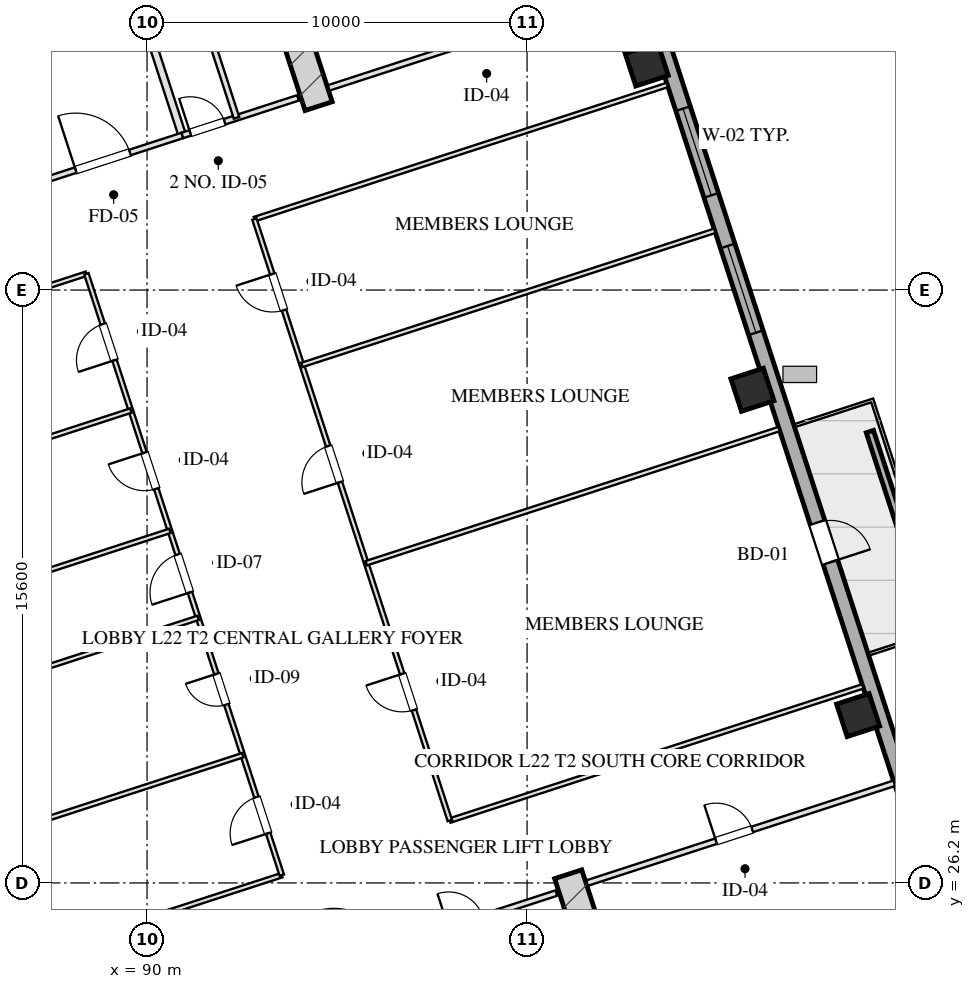
"""IFC4 building model, lengths in metres.
Left out: names, types, materials, properties, quantities, classifications, styles, units other than length and angle.
Written with IfcOpenShell. Run it as: python <this file> out.ifc"""

import sys

from ifc_helpers import new_model, si_unit, direction, frame, frame_2d, origin, origin_2d, place, context, subcontext, project, spatial, rectangle, hollow_rectangle, extrude, element, fill, save


model = new_model("IFC4")
c1 = context("Model", 3, precision=1e-05, world=origin(), true_north=direction((0.0, 1.0)))
c2 = subcontext(c1, "Body", "Model", "MODEL_VIEW")
j1 = project(units=[si_unit("LENGTHUNIT", "METRE"), si_unit("PLANEANGLEUNIT", "RADIAN")], contexts=[c1])
p1 = place(None, origin())
s1 = spatial("IfcSite", under=j1, at=p1, CompositionType="ELEMENT")
p2 = place(p1, origin())
s2 = spatial("IfcBuilding", under=s1, at=p2, CompositionType="ELEMENT")
p3 = place(p2, frame((0.0, 0.0, 88.55)))
s3 = spatial("IfcBuildingStorey", under=s2, at=p3, CompositionType="ELEMENT", Elevation=88.55)
for number, where, z_axis, x_axis in (
    (1, (101.082, 26.429, 0.0), (0.0, 0.0, 1.0), (0.309, -0.951, 0.0)),
    (2, (94.515, 46.639, 0.0), (0.0, 0.0, 1.0), (-0.309, 0.951, 0.0)),
):
    element("IfcWall", number, at=place(p3, frame(where, z_axis=z_axis, x_axis=x_axis)), inside=s3, PredefinedType="SHEAR", context=c2, shape_type="SweptSolid", body=[
        extrude(rectangle(XDim=9.63, YDim=0.75, at=frame_2d((4.815, 0.0))), origin(), (0.0, 0.0, 1.0), 3.45),
    ])
for number, where, z_axis, x_axis in (
    (3, (108.711, 30.616, 0.0), (0.0, 0.0, 1.0), (0.951, 0.309, 0.0)),
    (4, (105.93, 39.176, 0.0), (0.0, 0.0, 1.0), (0.951, 0.309, 0.0)),
    (5, (103.149, 47.736, 0.0), (0.0, 0.0, 1.0), (0.951, 0.309, 0.0)),
):
    element("IfcColumn", number, at=place(p3, frame(where, z_axis=z_axis, x_axis=x_axis)), inside=s3, PredefinedType="COLUMN", context=c2, shape_type="SweptSolid", body=[
        extrude(hollow_rectangle(XDim=0.9, YDim=0.9, WallThickness=0.032, at=origin_2d()), origin(), (0.0, 0.0, 1.0), 3.451),
    ])
p4 = place(p3, frame((99.284, 61.41, 0.0), z_axis=(0.0, 0.0, 1.0), x_axis=(0.309017542002, -0.95105633836, 0.0)))
e6 = element("IfcWall", 6, at=p4, inside=s3, PredefinedType="SOLIDWALL", context=c2, shape_type="SweptSolid", body=[
    extrude(rectangle(XDim=46.4, YDim=0.4, at=frame_2d((23.2, 0.0))), origin(), (0.0, 0.0, 1.0), 2.55),
])
p5 = place(p4, frame((19.4, 0.0, 0.75)))
e7 = element("IfcOpeningElement", 7, at=p5, cuts=e6, PredefinedType="OPENING", context=c2, shape_type="SweptSolid", body=[
    extrude(rectangle(XDim=2.4, YDim=1.4, at=frame_2d((1.2, 0.7))), frame((0.0, 0.21, 0.0), z_axis=(0.0, -1.0, 0.0), x_axis=(1.0, 0.0, 0.0)), (0.0, 0.0, 1.0), 0.42),
])
p6 = place(p4, frame((15.6, 0.0, 0.75)))
e8 = element("IfcOpeningElement", 8, at=p6, cuts=e6, PredefinedType="OPENING", context=c2, shape_type="SweptSolid", body=[
    extrude(rectangle(XDim=2.4, YDim=1.4, at=frame_2d((1.2, 0.7))), frame((0.0, 0.21, 0.0), z_axis=(0.0, -1.0, 0.0), x_axis=(1.0, 0.0, 0.0)), (0.0, 0.0, 1.0), 0.42),
])
p7 = place(p4, frame((27.05, 0.0, 0.0)))
e9 = element("IfcOpeningElement", 9, at=p7, cuts=e6, PredefinedType="OPENING", context=c2, shape_type="SweptSolid", body=[
    extrude(rectangle(XDim=1.1, YDim=2.15, at=frame_2d((0.55, 1.075))), frame((0.0, 0.21, 0.0), z_axis=(0.0, -1.0, 0.0), x_axis=(1.0, 0.0, 0.0)), (0.0, 0.0, 1.0), 0.42),
])
p8 = place(p3, frame((110.504, 33.512, 0.0), z_axis=(0.0, 0.0, 1.0), x_axis=(-0.308986014439, 0.951066581729, 0.0)))
e10 = element("IfcWall", 10, at=p8, inside=s3, PredefinedType="PARAPET", context=c2, shape_type="SweptSolid", body=[
    extrude(rectangle(XDim=4.8, YDim=0.2, at=frame_2d((2.4, 0.0))), origin(), (0.0, 0.0, 1.0), 0.75),
])
p9 = place(p3, frame((97.727, 24.944, 0.0), z_axis=(0.0, 0.0, 1.0), x_axis=(0.951036872128, 0.309077446369, 0.0)))
e11 = element("IfcWall", 11, at=p9, inside=s3, PredefinedType="PARTITIONING", context=c2, shape_type="SweptSolid", body=[
    extrude(rectangle(XDim=3.2, YDim=0.15, at=frame_2d((1.6, 0.0))), origin(), (0.0, 0.0, 1.0), 3.155),
])
p10 = place(p9, frame((0.22, 0.0, 0.0)))
e12 = element("IfcOpeningElement", 12, at=p10, cuts=e11, PredefinedType="OPENING", context=c2, shape_type="SweptSolid", body=[
    extrude(rectangle(XDim=0.95, YDim=2.05, at=frame_2d((0.475, 1.025))), frame((0.0, 0.085, 0.0), z_axis=(0.0, -1.0, 0.0), x_axis=(1.0, 0.0, 0.0)), (0.0, 0.0, 1.0), 0.17),
])
p11 = place(p3, frame((90.928, 45.868, 0.0), z_axis=(0.0, 0.0, 1.0), x_axis=(-0.309042196757, 0.951048327176, 0.0)))
e13 = element("IfcWall", 13, at=p11, inside=s3, PredefinedType="PARTITIONING", context=c2, shape_type="SweptSolid", body=[
    extrude(rectangle(XDim=8.43, YDim=0.2, at=frame_2d((4.215, 0.0))), origin(), (0.0, 0.0, 1.0), 3.155),
])
p12 = place(p3, frame((86.743, 44.508, 0.0), z_axis=(0.0, 0.0, 1.0), x_axis=(0.951063829732, 0.308994485023, 0.0)))
e14 = element("IfcWall", 14, at=p12, inside=s3, PredefinedType="PARTITIONING", context=c2, shape_type="SweptSolid", body=[
    extrude(rectangle(XDim=4.4, YDim=0.15, at=frame_2d((2.2, 0.0))), origin(), (0.0, 0.0, 1.0), 3.155),
])
p13 = place(p12, frame((1.45, 0.0, 0.0)))
e15 = element("IfcOpeningElement", 15, at=p13, cuts=e14, PredefinedType="OPENING", context=c2, shape_type="SweptSolid", body=[
    extrude(rectangle(XDim=1.5, YDim=2.05, at=frame_2d((0.75, 1.025))), frame((0.0, 0.085, 0.0), z_axis=(0.0, -1.0, 0.0), x_axis=(1.0, 0.0, 0.0)), (0.0, 0.0, 1.0), 0.17),
])
p14 = place(p3, frame((85.718, 47.666, 0.0), z_axis=(0.0, 0.0, 1.0), x_axis=(0.951058531764, 0.30901079133, 0.0)))
e16 = element("IfcWall", 16, at=p14, inside=s3, PredefinedType="PARTITIONING", context=c2, shape_type="SweptSolid", body=[
    extrude(rectangle(XDim=4.4, YDim=0.2, at=frame_2d((2.2, 0.0))), origin(), (0.0, 0.0, 1.0), 3.155),
])
p15 = place(p14, frame((0.45, 0.0, 0.0)))
e17 = element("IfcOpeningElement", 17, at=p15, cuts=e16, PredefinedType="OPENING", context=c2, shape_type="SweptSolid", body=[
    extrude(rectangle(XDim=1.1, YDim=2.05, at=frame_2d((0.55, 1.025))), frame((0.0, 0.11, 0.0), z_axis=(0.0, -1.0, 0.0), x_axis=(1.0, 0.0, 0.0)), (0.0, 0.0, 1.0), 0.22),
])
p16 = place(p14, frame((2.55, 0.0, 0.0)))
e18 = element("IfcOpeningElement", 18, at=p16, cuts=e16, PredefinedType="OPENING", context=c2, shape_type="SweptSolid", body=[
    extrude(rectangle(XDim=1.1, YDim=2.05, at=frame_2d((0.55, 1.025))), frame((0.0, 0.11, 0.0), z_axis=(0.0, -1.0, 0.0), x_axis=(1.0, 0.0, 0.0)), (0.0, 0.0, 1.0), 0.22),
])
p17 = place(p3, frame((90.928, 45.868, 0.0), z_axis=(0.0, 0.0, 1.0), x_axis=(0.951059297078, 0.309008435874, 0.0)))
e19 = element("IfcWall", 19, at=p17, inside=s3, PredefinedType="PARTITIONING", context=c2, shape_type="SweptSolid", body=[
    extrude(rectangle(XDim=3.2, YDim=0.15, at=frame_2d((1.6, 0.0))), origin(), (0.0, 0.0, 1.0), 3.155),
])
p18 = place(p17, frame((0.22, 0.0, 0.0)))
e20 = element("IfcOpeningElement", 20, at=p18, cuts=e19, PredefinedType="OPENING", context=c2, shape_type="SweptSolid", body=[
    extrude(rectangle(XDim=0.95, YDim=2.05, at=frame_2d((0.475, 1.025))), frame((0.0, 0.085, 0.0), z_axis=(0.0, -1.0, 0.0), x_axis=(1.0, 0.0, 0.0)), (0.0, 0.0, 1.0), 0.17),
])
p19 = place(p3, frame((92.355, 46.331, 0.0), z_axis=(0.0, 0.0, 1.0), x_axis=(-0.309007490203, 0.951059604335, 0.0)))
e21 = element("IfcWall", 21, at=p19, inside=s3, PredefinedType="PARTITIONING", context=c2, shape_type="SweptSolid", body=[
    extrude(rectangle(XDim=8.43, YDim=0.15, at=frame_2d((4.215, 0.0))), origin(), (0.0, 0.0, 1.0), 3.155),
])
p20 = place(p19, frame((2.55, 0.0, 0.0)))
e22 = element("IfcOpeningElement", 22, at=p20, cuts=e21, PredefinedType="OPENING", context=c2, shape_type="SweptSolid", body=[
    extrude(rectangle(XDim=0.95, YDim=2.05, at=frame_2d((0.475, 1.025))), frame((0.0, 0.085, 0.0), z_axis=(0.0, -1.0, 0.0), x_axis=(1.0, 0.0, 0.0)), (0.0, 0.0, 1.0), 0.17),
])
p21 = place(p19, frame((4.7, 0.0, 0.0)))
e23 = element("IfcOpeningElement", 23, at=p21, cuts=e21, PredefinedType="OPENING", context=c2, shape_type="SweptSolid", body=[
    extrude(rectangle(XDim=0.9, YDim=2.05, at=frame_2d((0.45, 1.025))), frame((0.0, 0.085, 0.0), z_axis=(0.0, -1.0, 0.0), x_axis=(1.0, 0.0, 0.0)), (0.0, 0.0, 1.0), 0.17),
])
p22 = place(p19, frame((6.8, 0.0, 0.0)))
e24 = element("IfcOpeningElement", 24, at=p22, cuts=e21, PredefinedType="OPENING", context=c2, shape_type="SweptSolid", body=[
    extrude(rectangle(XDim=0.9, YDim=2.05, at=frame_2d((0.45, 1.025))), frame((0.0, 0.085, 0.0), z_axis=(0.0, -1.0, 0.0), x_axis=(1.0, 0.0, 0.0)), (0.0, 0.0, 1.0), 0.17),
])
p23 = place(p3, frame((101.578, 26.196, 0.0), z_axis=(0.0, 0.0, 1.0), x_axis=(0.951062770994, 0.308997743729, 0.0)))
e25 = element("IfcWall", 25, at=p23, inside=s3, PredefinedType="PARTITIONING", context=c2, shape_type="SweptSolid", body=[
    extrude(rectangle(XDim=8.5, YDim=0.15, at=frame_2d((4.25, 0.0))), origin(), (0.0, 0.0, 1.0), 3.155),
])
p24 = place(p23, frame((3.57, 0.0, 0.0)))
e26 = element("IfcOpeningElement", 26, at=p24, cuts=e25, PredefinedType="OPENING", context=c2, shape_type="SweptSolid", body=[
    extrude(rectangle(XDim=1.0, YDim=2.05, at=frame_2d((0.5, 1.025))), frame((0.0, 0.085, 0.0), z_axis=(0.0, -1.0, 0.0), x_axis=(1.0, 0.0, 0.0)), (0.0, 0.0, 1.0), 0.17),
])
p25 = place(p3, frame((94.78, 47.119, 0.0), z_axis=(0.0, 0.0, 1.0), x_axis=(0.951054329824, 0.309023723562, 0.0)))
e27 = element("IfcWall", 27, at=p25, inside=s3, PredefinedType="PARTITIONING", context=c2, shape_type="SweptSolid", body=[
    extrude(rectangle(XDim=8.5, YDim=0.15, at=frame_2d((4.25, 0.0))), origin(), (0.0, 0.0, 1.0), 3.155),
])
p26 = place(p25, frame((3.57, 0.0, 0.0)))
e28 = element("IfcOpeningElement", 28, at=p26, cuts=e27, PredefinedType="OPENING", context=c2, shape_type="SweptSolid", body=[
    extrude(rectangle(XDim=1.0, YDim=2.05, at=frame_2d((0.5, 1.025))), frame((0.0, 0.085, 0.0), z_axis=(0.0, -1.0, 0.0), x_axis=(1.0, 0.0, 0.0)), (0.0, 0.0, 1.0), 0.17),
])
p27 = place(p3, frame((76.308, 20.803, 0.0), z_axis=(0.0, 0.0, 1.0), x_axis=(0.951054952586, 0.309021806935, 0.0)))
e29 = element("IfcWall", 29, at=p27, inside=s3, PredefinedType="PARTITIONING", context=c2, shape_type="SweptSolid", body=[
    extrude(rectangle(XDim=18.125, YDim=0.12, at=frame_2d((9.062, 0.0))), origin(), (0.0, 0.0, 1.0), 3.155),
])
p28 = place(p3, frame((97.968, 27.841, 0.0), z_axis=(0.0, 0.0, 1.0), x_axis=(0.951055737546, 0.309019391108, 0.0)))
e30 = element("IfcWall", 30, at=p28, inside=s3, PredefinedType="PARTITIONING", context=c2, shape_type="SweptSolid", body=[
    extrude(rectangle(XDim=11.425, YDim=0.12, at=frame_2d((5.712, 0.0))), origin(), (0.0, 0.0, 1.0), 3.155),
])
p29 = place(p3, frame((71.166, 36.629, 0.0), z_axis=(0.0, 0.0, 1.0), x_axis=(0.951057625014, 0.309013582067, 0.0)))
e31 = element("IfcWall", 31, at=p29, inside=s3, PredefinedType="PARTITIONING", context=c2, shape_type="SweptSolid", body=[
    extrude(rectangle(XDim=18.125, YDim=0.12, at=frame_2d((9.062, 0.0))), origin(), (0.0, 0.0, 1.0), 3.155),
])
p30 = place(p3, frame((92.826, 43.667, 0.0), z_axis=(0.0, 0.0, 1.0), x_axis=(0.951057778088, 0.309013110947, 0.0)))
e32 = element("IfcWall", 32, at=p30, inside=s3, PredefinedType="PARTITIONING", context=c2, shape_type="SweptSolid", body=[
    extrude(rectangle(XDim=11.425, YDim=0.12, at=frame_2d((5.712, 0.0))), origin(), (0.0, 0.0, 1.0), 3.155),
])
p31 = place(p3, frame((93.546, 26.404, 0.0), z_axis=(0.0, 0.0, 1.0), x_axis=(-0.309022042254, 0.951054876125, 0.0)))
e33 = element("IfcWall", 33, at=p31, inside=s3, PredefinedType="PARTITIONING", context=c2, shape_type="SweptSolid", body=[
    extrude(rectangle(XDim=16.64, YDim=0.12, at=frame_2d((8.32, 0.0))), origin(), (0.0, 0.0, 1.0), 3.155),
])
p32 = place(p31, frame((1.16, 0.0, 0.0)))
e34 = element("IfcOpeningElement", 34, at=p32, cuts=e33, PredefinedType="OPENING", context=c2, shape_type="SweptSolid", body=[
    extrude(rectangle(XDim=1.0, YDim=2.05, at=frame_2d((0.5, 1.025))), frame((0.0, 0.07, 0.0), z_axis=(0.0, -1.0, 0.0), x_axis=(1.0, 0.0, 0.0)), (0.0, 0.0, 1.0), 0.14),
])
p33 = place(p31, frame((4.72, 0.0, 0.0)))
e35 = element("IfcOpeningElement", 35, at=p33, cuts=e33, PredefinedType="OPENING", context=c2, shape_type="SweptSolid", body=[
    extrude(rectangle(XDim=0.85, YDim=2.05, at=frame_2d((0.425, 1.025))), frame((0.0, 0.07, 0.0), z_axis=(0.0, -1.0, 0.0), x_axis=(1.0, 0.0, 0.0)), (0.0, 0.0, 1.0), 0.14),
])
p34 = place(p31, frame((7.823, 0.0, 0.0)))
e36 = element("IfcOpeningElement", 36, at=p34, cuts=e33, PredefinedType="OPENING", context=c2, shape_type="SweptSolid", body=[
    extrude(rectangle(XDim=1.05, YDim=2.05, at=frame_2d((0.525, 1.025))), frame((0.0, 0.07, 0.0), z_axis=(0.0, -1.0, 0.0), x_axis=(1.0, 0.0, 0.0)), (0.0, 0.0, 1.0), 0.14),
])
p35 = place(p31, frame((10.69, 0.0, 0.0)))
e37 = element("IfcOpeningElement", 37, at=p35, cuts=e33, PredefinedType="OPENING", context=c2, shape_type="SweptSolid", body=[
    extrude(rectangle(XDim=1.0, YDim=2.05, at=frame_2d((0.5, 1.025))), frame((0.0, 0.07, 0.0), z_axis=(0.0, -1.0, 0.0), x_axis=(1.0, 0.0, 0.0)), (0.0, 0.0, 1.0), 0.14),
])
p36 = place(p31, frame((14.247, 0.0, 0.0)))
e38 = element("IfcOpeningElement", 38, at=p36, cuts=e33, PredefinedType="OPENING", context=c2, shape_type="SweptSolid", body=[
    extrude(rectangle(XDim=1.0, YDim=2.05, at=frame_2d((0.5, 1.025))), frame((0.0, 0.07, 0.0), z_axis=(0.0, -1.0, 0.0), x_axis=(1.0, 0.0, 0.0)), (0.0, 0.0, 1.0), 0.14),
])
p37 = place(p3, frame((97.968, 27.841, 0.0), z_axis=(0.0, 0.0, 1.0), x_axis=(-0.30901773025, 0.951056277195, 0.0)))
e39 = element("IfcWall", 39, at=p37, inside=s3, PredefinedType="PARTITIONING", context=c2, shape_type="SweptSolid", body=[
    extrude(rectangle(XDim=16.64, YDim=0.12, at=frame_2d((8.32, 0.0))), origin(), (0.0, 0.0, 1.0), 3.155),
])
p38 = place(p37, frame((3.06, 0.0, 0.0)))
e40 = element("IfcOpeningElement", 40, at=p38, cuts=e39, PredefinedType="OPENING", context=c2, shape_type="SweptSolid", body=[
    extrude(rectangle(XDim=1.0, YDim=2.05, at=frame_2d((0.5, 1.025))), frame((0.0, 0.07, 0.0), z_axis=(0.0, -1.0, 0.0), x_axis=(1.0, 0.0, 0.0)), (0.0, 0.0, 1.0), 0.14),
])
p39 = place(p37, frame((9.363, 0.0, 0.0)))
e41 = element("IfcOpeningElement", 41, at=p39, cuts=e39, PredefinedType="OPENING", context=c2, shape_type="SweptSolid", body=[
    extrude(rectangle(XDim=1.0, YDim=2.05, at=frame_2d((0.5, 1.025))), frame((0.0, 0.07, 0.0), z_axis=(0.0, -1.0, 0.0), x_axis=(1.0, 0.0, 0.0)), (0.0, 0.0, 1.0), 0.14),
])
p40 = place(p37, frame((14.123, 0.0, 0.0)))
e42 = element("IfcOpeningElement", 42, at=p40, cuts=e39, PredefinedType="OPENING", context=c2, shape_type="SweptSolid", body=[
    extrude(rectangle(XDim=1.0, YDim=2.05, at=frame_2d((0.5, 1.025))), frame((0.0, 0.07, 0.0), z_axis=(0.0, -1.0, 0.0), x_axis=(1.0, 0.0, 0.0)), (0.0, 0.0, 1.0), 0.14),
])
for number, where, z_axis, x_axis in (
    (43, (75.282, 23.96, 0.0), (0.0, 0.0, 1.0), (0.951, 0.309, 0.0)),
    (44, (74.108, 27.574, 0.0), (0.0, 0.0, 1.0), (0.951, 0.309, 0.0)),
):
    element("IfcWall", number, at=place(p3, frame(where, z_axis=z_axis, x_axis=x_axis)), inside=s3, PredefinedType="PARTITIONING", context=c2, shape_type="SweptSolid", body=[
        extrude(rectangle(XDim=18.125, YDim=0.12, at=frame_2d((9.062, 0.0))), origin(), (0.0, 0.0, 1.0), 3.155),
    ])
p41 = place(p3, frame((73.364, 29.863, 0.0), z_axis=(0.0, 0.0, 1.0), x_axis=(0.951057625014, 0.309013582067, 0.0)))
e45 = element("IfcWall", 45, at=p41, inside=s3, PredefinedType="PARTITIONING", context=c2, shape_type="SweptSolid", body=[
    extrude(rectangle(XDim=18.125, YDim=0.12, at=frame_2d((9.062, 0.0))), origin(), (0.0, 0.0, 1.0), 3.155),
])
p42 = place(p3, frame((72.336, 33.028, 0.0), z_axis=(0.0, 0.0, 1.0), x_axis=(0.951058911225, 0.309009623443, 0.0)))
e46 = element("IfcWall", 46, at=p42, inside=s3, PredefinedType="PARTITIONING", context=c2, shape_type="SweptSolid", body=[
    extrude(rectangle(XDim=18.125, YDim=0.12, at=frame_2d((9.062, 0.0))), origin(), (0.0, 0.0, 1.0), 3.155),
])
p43 = place(p3, frame((95.768, 34.612, 0.0), z_axis=(0.0, 0.0, 1.0), x_axis=(0.951055737546, 0.309019391108, 0.0)))
e47 = element("IfcWall", 47, at=p43, inside=s3, PredefinedType="PARTITIONING", context=c2, shape_type="SweptSolid", body=[
    extrude(rectangle(XDim=11.425, YDim=0.12, at=frame_2d((5.712, 0.0))), origin(), (0.0, 0.0, 1.0), 3.155),
])
p44 = place(p3, frame((94.073, 39.829, 0.0), z_axis=(0.0, 0.0, 1.0), x_axis=(0.951057778088, 0.309013110947, 0.0)))
e48 = element("IfcWall", 48, at=p44, inside=s3, PredefinedType="PARTITIONING", context=c2, shape_type="SweptSolid", body=[
    extrude(rectangle(XDim=11.425, YDim=0.12, at=frame_2d((5.712, 0.0))), origin(), (0.0, 0.0, 1.0), 3.155),
])
p45 = place(p5, origin())
e49 = element("IfcWindow", 49, at=p45, inside=s3, PartitioningType="TRIPLE_PANEL_VERTICAL", PredefinedType="WINDOW", context=c2, shape_type="SweptSolid", body=[
    extrude(rectangle(XDim=2.4, YDim=1.4, at=frame_2d((1.2, 0.7))), frame((0.0, 0.03, 0.0), z_axis=(0.0, -1.0, 0.0), x_axis=(1.0, 0.0, 0.0)), (0.0, 0.0, 1.0), 0.06),
])
fill(e7, e49)
p46 = place(p6, origin())
e50 = element("IfcWindow", 50, at=p46, inside=s3, PartitioningType="TRIPLE_PANEL_VERTICAL", PredefinedType="WINDOW", context=c2, shape_type="SweptSolid", body=[
    extrude(rectangle(XDim=2.4, YDim=1.4, at=frame_2d((1.2, 0.7))), frame((0.0, 0.03, 0.0), z_axis=(0.0, -1.0, 0.0), x_axis=(1.0, 0.0, 0.0)), (0.0, 0.0, 1.0), 0.06),
])
fill(e8, e50)
p47 = place(p7, origin())
e51 = element("IfcDoor", 51, at=p47, inside=s3, OperationType="SINGLE_SWING_RIGHT", PredefinedType="DOOR", context=c2, shape_type="SweptSolid", body=[
    extrude(rectangle(XDim=1.1, YDim=2.15, at=frame_2d((0.55, 1.075))), frame((0.0, 0.025, 0.0), z_axis=(0.0, -1.0, 0.0), x_axis=(1.0, 0.0, 0.0)), (0.0, 0.0, 1.0), 0.05),
])
fill(e9, e51)
p48 = place(p13, origin())
e52 = element("IfcDoor", 52, at=p48, inside=s3, OperationType="SINGLE_SWING_LEFT", PredefinedType="DOOR", context=c2, shape_type="SweptSolid", body=[
    extrude(rectangle(XDim=1.5, YDim=2.05, at=frame_2d((0.75, 1.025))), frame((0.0, 0.025, 0.0), z_axis=(0.0, -1.0, 0.0), x_axis=(1.0, 0.0, 0.0)), (0.0, 0.0, 1.0), 0.05),
])
fill(e15, e52)
p49 = place(p18, origin())
e53 = element("IfcDoor", 53, at=p49, inside=s3, OperationType="SINGLE_SWING_LEFT", PredefinedType="DOOR", context=c2, shape_type="SweptSolid", body=[
    extrude(rectangle(XDim=0.95, YDim=2.05, at=frame_2d((0.475, 1.025))), frame((0.0, 0.025, 0.0), z_axis=(0.0, -1.0, 0.0), x_axis=(1.0, 0.0, 0.0)), (0.0, 0.0, 1.0), 0.05),
])
fill(e20, e53)
p50 = place(p24, origin())
e54 = element("IfcDoor", 54, at=p50, inside=s3, OperationType="SINGLE_SWING_LEFT", PredefinedType="DOOR", context=c2, shape_type="SweptSolid", body=[
    extrude(rectangle(XDim=1.0, YDim=2.05, at=frame_2d((0.5, 1.025))), frame((0.0, 0.025, 0.0), z_axis=(0.0, -1.0, 0.0), x_axis=(1.0, 0.0, 0.0)), (0.0, 0.0, 1.0), 0.05),
])
fill(e26, e54)
p51 = place(p32, origin())
e55 = element("IfcDoor", 55, at=p51, inside=s3, OperationType="SINGLE_SWING_LEFT", PredefinedType="DOOR", context=c2, shape_type="SweptSolid", body=[
    extrude(rectangle(XDim=1.0, YDim=2.05, at=frame_2d((0.5, 1.025))), frame((0.0, 0.025, 0.0), z_axis=(0.0, -1.0, 0.0), x_axis=(1.0, 0.0, 0.0)), (0.0, 0.0, 1.0), 0.05),
])
fill(e34, e55)
p52 = place(p33, origin())
e56 = element("IfcDoor", 56, at=p52, inside=s3, OperationType="SINGLE_SWING_RIGHT", PredefinedType="DOOR", context=c2, shape_type="SweptSolid", body=[
    extrude(rectangle(XDim=0.85, YDim=2.05, at=frame_2d((0.425, 1.025))), frame((0.0, 0.025, 0.0), z_axis=(0.0, -1.0, 0.0), x_axis=(1.0, 0.0, 0.0)), (0.0, 0.0, 1.0), 0.05),
])
fill(e35, e56)
p53 = place(p34, origin())
e57 = element("IfcDoor", 57, at=p53, inside=s3, OperationType="SINGLE_SWING_LEFT", PredefinedType="DOOR", context=c2, shape_type="SweptSolid", body=[
    extrude(rectangle(XDim=1.05, YDim=2.05, at=frame_2d((0.525, 1.025))), frame((0.0, 0.025, 0.0), z_axis=(0.0, -1.0, 0.0), x_axis=(1.0, 0.0, 0.0)), (0.0, 0.0, 1.0), 0.05),
])
fill(e36, e57)
p54 = place(p35, origin())
e58 = element("IfcDoor", 58, at=p54, inside=s3, OperationType="SINGLE_SWING_RIGHT", PredefinedType="DOOR", context=c2, shape_type="SweptSolid", body=[
    extrude(rectangle(XDim=1.0, YDim=2.05, at=frame_2d((0.5, 1.025))), frame((0.0, 0.025, 0.0), z_axis=(0.0, -1.0, 0.0), x_axis=(1.0, 0.0, 0.0)), (0.0, 0.0, 1.0), 0.05),
])
fill(e37, e58)
p55 = place(p36, origin())
e59 = element("IfcDoor", 59, at=p55, inside=s3, OperationType="SINGLE_SWING_LEFT", PredefinedType="DOOR", context=c2, shape_type="SweptSolid", body=[
    extrude(rectangle(XDim=1.0, YDim=2.05, at=frame_2d((0.5, 1.025))), frame((0.0, 0.025, 0.0), z_axis=(0.0, -1.0, 0.0), x_axis=(1.0, 0.0, 0.0)), (0.0, 0.0, 1.0), 0.05),
])
fill(e38, e59)
p56 = place(p38, origin())
e60 = element("IfcDoor", 60, at=p56, inside=s3, OperationType="SINGLE_SWING_RIGHT", PredefinedType="DOOR", context=c2, shape_type="SweptSolid", body=[
    extrude(rectangle(XDim=1.0, YDim=2.05, at=frame_2d((0.5, 1.025))), frame((0.0, 0.025, 0.0), z_axis=(0.0, -1.0, 0.0), x_axis=(1.0, 0.0, 0.0)), (0.0, 0.0, 1.0), 0.05),
])
fill(e40, e60)
p57 = place(p39, origin())
e61 = element("IfcDoor", 61, at=p57, inside=s3, OperationType="SINGLE_SWING_LEFT", PredefinedType="DOOR", context=c2, shape_type="SweptSolid", body=[
    extrude(rectangle(XDim=1.0, YDim=2.05, at=frame_2d((0.5, 1.025))), frame((0.0, 0.025, 0.0), z_axis=(0.0, -1.0, 0.0), x_axis=(1.0, 0.0, 0.0)), (0.0, 0.0, 1.0), 0.05),
])
fill(e41, e61)
p58 = place(p40, origin())
e62 = element("IfcDoor", 62, at=p58, inside=s3, OperationType="SINGLE_SWING_RIGHT", PredefinedType="DOOR", context=c2, shape_type="SweptSolid", body=[
    extrude(rectangle(XDim=1.0, YDim=2.05, at=frame_2d((0.5, 1.025))), frame((0.0, 0.025, 0.0), z_axis=(0.0, -1.0, 0.0), x_axis=(1.0, 0.0, 0.0)), (0.0, 0.0, 1.0), 0.05),
])
fill(e42, e62)
save(model, sys.argv[1])
